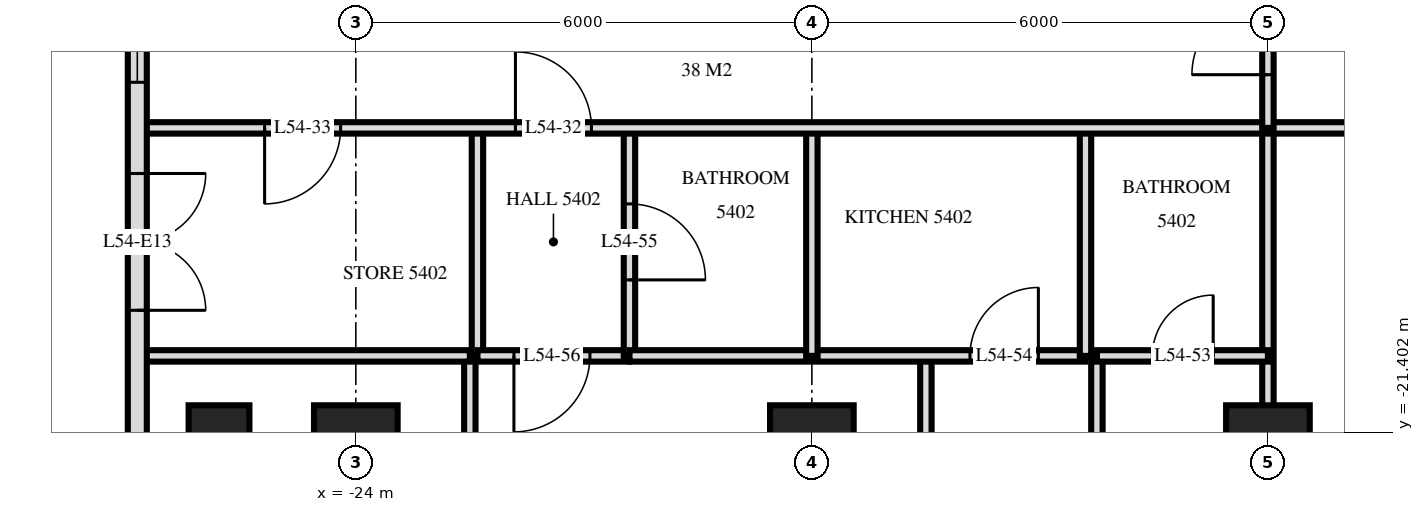
"""IFC4 building model, lengths in metres.
Left out: names, types, materials, properties, quantities, classifications, styles, units other than length and angle.
Written with IfcOpenShell. Run it as: python <this file> out.ifc"""

import sys

from ifc_helpers import new_model, si_unit, direction, frame, frame_2d, origin, origin_2d, place, context, subcontext, project, spatial, rectangle, extrude, element, fill, save


model = new_model("IFC4")
c1 = context("Model", 3, precision=1e-05, world=origin(), true_north=direction((0.0, 1.0)))
c2 = subcontext(c1, "Body", "Model", "MODEL_VIEW")
j1 = project(units=[si_unit("LENGTHUNIT", "METRE"), si_unit("PLANEANGLEUNIT", "RADIAN")], contexts=[c1])
p1 = place(None, origin())
s1 = spatial("IfcSite", under=j1, at=p1, CompositionType="ELEMENT")
p2 = place(p1, origin())
s2 = spatial("IfcBuilding", under=s1, at=p2, CompositionType="ELEMENT")
p3 = place(p2, frame((0.0, 0.0, 208.1)))
s3 = spatial("IfcBuildingStorey", under=s2, at=p3, CompositionType="ELEMENT", Elevation=208.1)
p4 = place(p3, frame((-25.8, -21.6, 0.0), z_axis=(0.0, 0.0, 1.0), x_axis=(0.0, 1.0, 0.0)))
e1 = element("IfcColumn", 1, at=p4, inside=s3, PredefinedType="COLUMN", context=c2, shape_type="SweptSolid", body=[
    extrude(rectangle(XDim=1.1, YDim=0.8, at=origin_2d()), origin(), (0.0, 0.0, 1.0), 3.5),
])
for number, where, z_axis, x_axis in (
    (2, (-24.0, -21.6, 0.0), (0.0, 0.0, 1.0), (1.0, 0.0, 0.0)),
    (3, (-18.0, -21.6, 0.0), (0.0, 0.0, 1.0), (1.0, 0.0, 0.0)),
    (4, (-12.0, -21.6, 0.0), (0.0, 0.0, 1.0), (1.0, 0.0, 0.0)),
):
    element("IfcColumn", number, at=place(p3, frame(where, z_axis=z_axis, x_axis=x_axis)), inside=s3, PredefinedType="COLUMN", context=c2, shape_type="SweptSolid", body=[
        extrude(rectangle(XDim=1.1, YDim=1.1, at=origin_2d()), origin(), (0.0, 0.0, 1.0), 3.5),
    ])
p5 = place(p3, frame((-26.875, -3.325, 0.0), z_axis=(0.0, 0.0, 1.0), x_axis=(0.0, -1.0, 0.0)))
e5 = element("IfcWall", 5, at=p5, inside=s3, PredefinedType="SOLIDWALL", context=c2, shape_type="SweptSolid", body=[
    extrude(rectangle(XDim=21.551, YDim=0.25, at=frame_2d((10.775, 0.0))), origin(), (0.0, 0.0, 1.0), 3.22),
])
p6 = place(p5, frame((6.65, 0.0, 0.0)))
e6 = element("IfcOpeningElement", 6, at=p6, cuts=e5, PredefinedType="OPENING", context=c2, shape_type="SweptSolid", body=[
    extrude(rectangle(XDim=1.8, YDim=2.4, at=frame_2d((0.9, 1.2))), frame((0.0, 0.135, 0.0), z_axis=(0.0, -1.0, 0.0), x_axis=(1.0, 0.0, 0.0)), (0.0, 0.0, 1.0), 0.27),
])
p7 = place(p5, frame((12.275, 0.0, 0.9)))
e7 = element("IfcOpeningElement", 7, at=p7, cuts=e5, PredefinedType="OPENING", context=c2, shape_type="SweptSolid", body=[
    extrude(rectangle(XDim=1.2, YDim=1.5, at=frame_2d((0.6, 0.75))), frame((0.0, 0.135, 0.0), z_axis=(0.0, -1.0, 0.0), x_axis=(1.0, 0.0, 0.0)), (0.0, 0.0, 1.0), 0.27),
])
p8 = place(p5, frame((14.675, 0.0, 0.0)))
e8 = element("IfcOpeningElement", 8, at=p8, cuts=e5, PredefinedType="OPENING", context=c2, shape_type="SweptSolid", body=[
    extrude(rectangle(XDim=1.8, YDim=2.4, at=frame_2d((0.9, 1.2))), frame((0.0, 0.135, 0.0), z_axis=(0.0, -1.0, 0.0), x_axis=(1.0, 0.0, 0.0)), (0.0, 0.0, 1.0), 0.27),
])
p9 = place(p5, frame((18.875, 0.0, 0.0)))
e9 = element("IfcOpeningElement", 9, at=p9, cuts=e5, PredefinedType="OPENING", context=c2, shape_type="SweptSolid", body=[
    extrude(rectangle(XDim=1.8, YDim=2.4, at=frame_2d((0.9, 1.2))), frame((0.0, 0.135, 0.0), z_axis=(0.0, -1.0, 0.0), x_axis=(1.0, 0.0, 0.0)), (0.0, 0.0, 1.0), 0.27),
])
p10 = place(p3, frame((-12.0, -17.4, 0.0), z_axis=(0.0, 0.0, 1.0), x_axis=(0.0, 1.0, 0.0)))
e10 = element("IfcWall", 10, at=p10, inside=s3, PredefinedType="PARTITIONING", context=c2, shape_type="SweptSolid", body=[
    extrude(rectangle(XDim=2.35, YDim=0.15, at=frame_2d((1.175, 0.0))), origin(), (0.0, 0.0, 1.0), 3.22),
])
p11 = place(p10, frame((0.7, 0.0, 0.0)))
e11 = element("IfcOpeningElement", 11, at=p11, cuts=e10, PredefinedType="OPENING", context=c2, shape_type="SweptSolid", body=[
    extrude(rectangle(XDim=1.0, YDim=2.1, at=frame_2d((0.5, 1.05))), frame((0.0, 0.085, 0.0), z_axis=(0.0, -1.0, 0.0), x_axis=(1.0, 0.0, 0.0)), (0.0, 0.0, 1.0), 0.17),
])
p12 = place(p3, frame((-12.0, -29.22, 0.0), z_axis=(0.0, 0.0, 1.0), x_axis=(0.0, 1.0, 0.0)))
e12 = element("IfcWall", 12, at=p12, inside=s3, PredefinedType="PARTITIONING", context=c2, shape_type="SweptSolid", body=[
    extrude(rectangle(XDim=11.82, YDim=0.15, at=frame_2d((5.91, 0.0))), origin(), (0.0, 0.0, 1.0), 3.22),
])
p13 = place(p3, frame((-14.25, -29.22, 0.0), z_axis=(0.0, 0.0, 1.0), x_axis=(0.0, 1.0, 0.0)))
e13 = element("IfcWall", 13, at=p13, inside=s3, PredefinedType="PARTITIONING", context=c2, shape_type="SweptSolid", body=[
    extrude(rectangle(XDim=8.82, YDim=0.15, at=frame_2d((4.41, 0.0))), origin(), (0.0, 0.0, 1.0), 3.22),
])
p14 = place(p13, frame((3.87, 0.0, 0.0)))
e14 = element("IfcOpeningElement", 14, at=p14, cuts=e13, PredefinedType="OPENING", context=c2, shape_type="SweptSolid", body=[
    extrude(rectangle(XDim=0.9, YDim=2.1, at=frame_2d((0.45, 1.05))), frame((0.0, 0.085, 0.0), z_axis=(0.0, -1.0, 0.0), x_axis=(1.0, 0.0, 0.0)), (0.0, 0.0, 1.0), 0.17),
])
p15 = place(p3, frame((-14.4, -20.4, 0.0), z_axis=(0.0, 0.0, 1.0), x_axis=(0.0, 1.0, 0.0)))
e15 = element("IfcWall", 15, at=p15, inside=s3, PredefinedType="PARTITIONING", context=c2, shape_type="SweptSolid", body=[
    extrude(rectangle(XDim=3.0, YDim=0.15, at=frame_2d((1.5, 0.0))), origin(), (0.0, 0.0, 1.0), 3.22),
])
p16 = place(p3, frame((-16.5, -29.22, 0.0), z_axis=(0.0, 0.0, 1.0), x_axis=(0.0, 1.0, 0.0)))
e16 = element("IfcWall", 16, at=p16, inside=s3, PredefinedType="PARTITIONING", context=c2, shape_type="SweptSolid", body=[
    extrude(rectangle(XDim=8.82, YDim=0.15, at=frame_2d((4.41, 0.0))), origin(), (0.0, 0.0, 1.0), 3.22),
])
p17 = place(p16, frame((3.85, 0.0, 0.0)))
e17 = element("IfcOpeningElement", 17, at=p17, cuts=e16, PredefinedType="OPENING", context=c2, shape_type="SweptSolid", body=[
    extrude(rectangle(XDim=0.9, YDim=2.1, at=frame_2d((0.45, 1.05))), frame((0.0, 0.085, 0.0), z_axis=(0.0, -1.0, 0.0), x_axis=(1.0, 0.0, 0.0)), (0.0, 0.0, 1.0), 0.17),
])
p18 = place(p3, frame((-18.0, -20.4, 0.0), z_axis=(0.0, 0.0, 1.0), x_axis=(0.0, 1.0, 0.0)))
e18 = element("IfcWall", 18, at=p18, inside=s3, PredefinedType="PARTITIONING", context=c2, shape_type="SweptSolid", body=[
    extrude(rectangle(XDim=3.0, YDim=0.15, at=frame_2d((1.5, 0.0))), origin(), (0.0, 0.0, 1.0), 3.22),
])
p19 = place(p3, frame((-20.4, -20.4, 0.0), z_axis=(0.0, 0.0, 1.0), x_axis=(0.0, 1.0, 0.0)))
e19 = element("IfcWall", 19, at=p19, inside=s3, PredefinedType="PARTITIONING", context=c2, shape_type="SweptSolid", body=[
    extrude(rectangle(XDim=3.0, YDim=0.15, at=frame_2d((1.5, 0.0))), origin(), (0.0, 0.0, 1.0), 3.22),
])
p20 = place(p19, frame((1.0, 0.0, 0.0)))
e20 = element("IfcOpeningElement", 20, at=p20, cuts=e19, PredefinedType="OPENING", context=c2, shape_type="SweptSolid", body=[
    extrude(rectangle(XDim=1.0, YDim=2.1, at=frame_2d((0.5, 1.05))), frame((0.0, 0.085, 0.0), z_axis=(0.0, -1.0, 0.0), x_axis=(1.0, 0.0, 0.0)), (0.0, 0.0, 1.0), 0.17),
])
p21 = place(p3, frame((-22.4, -20.4, 0.0), z_axis=(0.0, 0.0, 1.0), x_axis=(0.0, 1.0, 0.0)))
e21 = element("IfcWall", 21, at=p21, inside=s3, PredefinedType="PARTITIONING", context=c2, shape_type="SweptSolid", body=[
    extrude(rectangle(XDim=3.0, YDim=0.15, at=frame_2d((1.5, 0.0))), origin(), (0.0, 0.0, 1.0), 3.22),
])
p22 = place(p3, frame((-22.5, -29.217, 0.0), z_axis=(0.0, 0.0, 1.0), x_axis=(0.0, 1.0, 0.0)))
e22 = element("IfcWall", 22, at=p22, inside=s3, PredefinedType="PARTITIONING", context=c2, shape_type="SweptSolid", body=[
    extrude(rectangle(XDim=8.817, YDim=0.15, at=frame_2d((4.408, 0.0))), origin(), (0.0, 0.0, 1.0), 3.22),
])
p23 = place(p22, frame((3.886, 0.0, 0.0)))
e23 = element("IfcOpeningElement", 23, at=p23, cuts=e22, PredefinedType="OPENING", context=c2, shape_type="SweptSolid", body=[
    extrude(rectangle(XDim=0.9, YDim=2.1, at=frame_2d((0.45, 1.05))), frame((0.0, 0.085, 0.0), z_axis=(0.0, -1.0, 0.0), x_axis=(1.0, 0.0, 0.0)), (0.0, 0.0, 1.0), 0.17),
])
p24 = place(p3, frame((-22.4, -20.4, 0.0), z_axis=(0.0, 0.0, 1.0), x_axis=(1.0, 0.0, 0.0)))
e24 = element("IfcWall", 24, at=p24, inside=s3, PredefinedType="PARTITIONING", context=c2, shape_type="SweptSolid", body=[
    extrude(rectangle(XDim=2.0, YDim=0.15, at=frame_2d((1.0, 0.0))), origin(), (0.0, 0.0, 1.0), 3.22),
])
p25 = place(p24, frame((0.48, 0.0, 0.0)))
e25 = element("IfcOpeningElement", 25, at=p25, cuts=e24, PredefinedType="OPENING", context=c2, shape_type="SweptSolid", body=[
    extrude(rectangle(XDim=1.0, YDim=2.1, at=frame_2d((0.5, 1.05))), frame((0.0, 0.085, 0.0), z_axis=(0.0, -1.0, 0.0), x_axis=(1.0, 0.0, 0.0)), (0.0, 0.0, 1.0), 0.17),
])
p26 = place(p3, frame((-26.82, -20.4, 0.0), z_axis=(0.0, 0.0, 1.0), x_axis=(1.0, 0.0, 0.0)))
e26 = element("IfcWall", 26, at=p26, inside=s3, PredefinedType="PARTITIONING", context=c2, shape_type="SweptSolid", body=[
    extrude(rectangle(XDim=4.32, YDim=0.15, at=frame_2d((2.16, 0.0))), origin(), (0.0, 0.0, 1.0), 3.22),
])
p27 = place(p3, frame((-20.4, -20.4, 0.0), z_axis=(0.0, 0.0, 1.0), x_axis=(1.0, 0.0, 0.0)))
e27 = element("IfcWall", 27, at=p27, inside=s3, PredefinedType="PARTITIONING", context=c2, shape_type="SweptSolid", body=[
    extrude(rectangle(XDim=6.0, YDim=0.15, at=frame_2d((3.0, 0.0))), origin(), (0.0, 0.0, 1.0), 3.22),
])
p28 = place(p27, frame((4.48, 0.0, 0.0)))
e28 = element("IfcOpeningElement", 28, at=p28, cuts=e27, PredefinedType="OPENING", context=c2, shape_type="SweptSolid", body=[
    extrude(rectangle(XDim=0.9, YDim=2.1, at=frame_2d((0.45, 1.05))), frame((0.0, 0.085, 0.0), z_axis=(0.0, -1.0, 0.0), x_axis=(1.0, 0.0, 0.0)), (0.0, 0.0, 1.0), 0.17),
])
p29 = place(p3, frame((-14.25, -20.4, 0.0), z_axis=(0.0, 0.0, 1.0), x_axis=(1.0, 0.0, 0.0)))
e29 = element("IfcWall", 29, at=p29, inside=s3, PredefinedType="PARTITIONING", context=c2, shape_type="SweptSolid", body=[
    extrude(rectangle(XDim=2.25, YDim=0.15, at=frame_2d((1.125, 0.0))), origin(), (0.0, 0.0, 1.0), 3.22),
])
p30 = place(p29, frame((0.73, 0.0, 0.0)))
e30 = element("IfcOpeningElement", 30, at=p30, cuts=e29, PredefinedType="OPENING", context=c2, shape_type="SweptSolid", body=[
    extrude(rectangle(XDim=0.8, YDim=2.1, at=frame_2d((0.4, 1.05))), frame((0.0, 0.085, 0.0), z_axis=(0.0, -1.0, 0.0), x_axis=(1.0, 0.0, 0.0)), (0.0, 0.0, 1.0), 0.17),
])
p31 = place(p3, frame((-26.82, -17.4, 0.0), z_axis=(0.0, 0.0, 1.0), x_axis=(1.0, 0.0, 0.0)))
e31 = element("IfcWall", 31, at=p31, inside=s3, PredefinedType="PARTITIONING", context=c2, shape_type="SweptSolid", body=[
    extrude(rectangle(XDim=53.64, YDim=0.15, at=frame_2d((26.82, 0.0))), origin(), (0.0, 0.0, 1.0), 3.22),
])
p32 = place(p31, frame((4.92, 0.0, 0.0)))
e32 = element("IfcOpeningElement", 32, at=p32, cuts=e31, PredefinedType="OPENING", context=c2, shape_type="SweptSolid", body=[
    extrude(rectangle(XDim=1.0, YDim=2.1, at=frame_2d((0.5, 1.05))), frame((0.0, 0.085, 0.0), z_axis=(0.0, -1.0, 0.0), x_axis=(1.0, 0.0, 0.0)), (0.0, 0.0, 1.0), 0.17),
])
p33 = place(p31, frame((1.62, 0.0, 0.0)))
e33 = element("IfcOpeningElement", 33, at=p33, cuts=e31, PredefinedType="OPENING", context=c2, shape_type="SweptSolid", body=[
    extrude(rectangle(XDim=1.0, YDim=2.1, at=frame_2d((0.5, 1.05))), frame((0.0, 0.085, 0.0), z_axis=(0.0, -1.0, 0.0), x_axis=(1.0, 0.0, 0.0)), (0.0, 0.0, 1.0), 0.17),
])
p34 = place(p31, frame((41.17, 0.0, 0.0)))
e34 = element("IfcOpeningElement", 34, at=p34, cuts=e31, PredefinedType="OPENING", context=c2, shape_type="SweptSolid", body=[
    extrude(rectangle(XDim=1.0, YDim=2.1, at=frame_2d((0.5, 1.05))), frame((0.0, 0.085, 0.0), z_axis=(0.0, -1.0, 0.0), x_axis=(1.0, 0.0, 0.0)), (0.0, 0.0, 1.0), 0.17),
])
p35 = place(p31, frame((49.42, 0.0, 0.0)))
e35 = element("IfcOpeningElement", 35, at=p35, cuts=e31, PredefinedType="OPENING", context=c2, shape_type="SweptSolid", body=[
    extrude(rectangle(XDim=1.0, YDim=2.1, at=frame_2d((0.5, 1.05))), frame((0.0, 0.085, 0.0), z_axis=(0.0, -1.0, 0.0), x_axis=(1.0, 0.0, 0.0)), (0.0, 0.0, 1.0), 0.17),
])
p36 = place(p31, frame((47.62, 0.0, 0.0)))
e36 = element("IfcOpeningElement", 36, at=p36, cuts=e31, PredefinedType="OPENING", context=c2, shape_type="SweptSolid", body=[
    extrude(rectangle(XDim=1.0, YDim=2.1, at=frame_2d((0.5, 1.05))), frame((0.0, 0.085, 0.0), z_axis=(0.0, -1.0, 0.0), x_axis=(1.0, 0.0, 0.0)), (0.0, 0.0, 1.0), 0.17),
])
p37 = place(p31, frame((21.82, 0.0, 0.0)))
e37 = element("IfcOpeningElement", 37, at=p37, cuts=e31, PredefinedType="OPENING", context=c2, shape_type="SweptSolid", body=[
    extrude(rectangle(XDim=1.0, YDim=2.1, at=frame_2d((0.5, 1.05))), frame((0.0, 0.085, 0.0), z_axis=(0.0, -1.0, 0.0), x_axis=(1.0, 0.0, 0.0)), (0.0, 0.0, 1.0), 0.17),
])
p38 = place(p31, frame((33.82, 0.0, 0.0)))
e38 = element("IfcOpeningElement", 38, at=p38, cuts=e31, PredefinedType="OPENING", context=c2, shape_type="SweptSolid", body=[
    extrude(rectangle(XDim=1.0, YDim=2.1, at=frame_2d((0.5, 1.05))), frame((0.0, 0.085, 0.0), z_axis=(0.0, -1.0, 0.0), x_axis=(1.0, 0.0, 0.0)), (0.0, 0.0, 1.0), 0.17),
])
p39 = place(p7, origin())
e39 = element("IfcWindow", 39, at=p39, inside=s3, PartitioningType="SINGLE_PANEL", PredefinedType="WINDOW", context=c2, shape_type="SweptSolid", body=[
    extrude(rectangle(XDim=1.2, YDim=1.5, at=frame_2d((0.6, 0.75))), frame((0.0, 0.03, 0.0), z_axis=(0.0, -1.0, 0.0), x_axis=(1.0, 0.0, 0.0)), (0.0, 0.0, 1.0), 0.06),
])
fill(e7, e39)
p40 = place(p8, origin())
e40 = element("IfcDoor", 40, at=p40, inside=s3, OperationType="DOUBLE_DOOR_SINGLE_SWING", PredefinedType="DOOR", context=c2, shape_type="SweptSolid", body=[
    extrude(rectangle(XDim=1.8, YDim=2.4, at=frame_2d((0.9, 1.2))), frame((0.0, 0.025, 0.0), z_axis=(0.0, -1.0, 0.0), x_axis=(1.0, 0.0, 0.0)), (0.0, 0.0, 1.0), 0.05),
])
fill(e8, e40)
p41 = place(p11, origin())
e41 = element("IfcDoor", 41, at=p41, inside=s3, OperationType="SINGLE_SWING_RIGHT", PredefinedType="DOOR", context=c2, shape_type="SweptSolid", body=[
    extrude(rectangle(XDim=1.0, YDim=2.1, at=frame_2d((0.5, 1.05))), frame((0.0, 0.025, 0.0), z_axis=(0.0, -1.0, 0.0), x_axis=(1.0, 0.0, 0.0)), (0.0, 0.0, 1.0), 0.05),
])
fill(e11, e41)
p42 = place(p32, origin())
e42 = element("IfcDoor", 42, at=p42, inside=s3, OperationType="SINGLE_SWING_RIGHT", PredefinedType="DOOR", context=c2, shape_type="SweptSolid", body=[
    extrude(rectangle(XDim=1.0, YDim=2.1, at=frame_2d((0.5, 1.05))), frame((0.0, 0.025, 0.0), z_axis=(0.0, -1.0, 0.0), x_axis=(1.0, 0.0, 0.0)), (0.0, 0.0, 1.0), 0.05),
])
fill(e32, e42)
p43 = place(p33, frame((0.5, 0.0, 0.0), z_axis=(0.0, 0.0, 1.0), x_axis=(-1.0, 0.0, 0.0)))
e43 = element("IfcDoor", 43, at=p43, inside=s3, OperationType="SINGLE_SWING_LEFT", PredefinedType="DOOR", context=c2, shape_type="SweptSolid", body=[
    extrude(rectangle(XDim=1.0, YDim=2.1, at=frame_2d((0.0, 1.05))), frame((0.0, -0.025, 0.0), z_axis=(0.0, 1.0, 0.0), x_axis=(-1.0, 0.0, 0.0)), (0.0, 0.0, 1.0), 0.05),
])
fill(e33, e43)
p44 = place(p30, origin())
e44 = element("IfcDoor", 44, at=p44, inside=s3, OperationType="SINGLE_SWING_LEFT", PredefinedType="DOOR", context=c2, shape_type="SweptSolid", body=[
    extrude(rectangle(XDim=0.8, YDim=2.1, at=frame_2d((0.4, 1.05))), frame((0.0, 0.025, 0.0), z_axis=(0.0, -1.0, 0.0), x_axis=(1.0, 0.0, 0.0)), (0.0, 0.0, 1.0), 0.05),
])
fill(e30, e44)
p45 = place(p28, origin())
e45 = element("IfcDoor", 45, at=p45, inside=s3, OperationType="SINGLE_SWING_LEFT", PredefinedType="DOOR", context=c2, shape_type="SweptSolid", body=[
    extrude(rectangle(XDim=0.9, YDim=2.1, at=frame_2d((0.45, 1.05))), frame((0.0, 0.025, 0.0), z_axis=(0.0, -1.0, 0.0), x_axis=(1.0, 0.0, 0.0)), (0.0, 0.0, 1.0), 0.05),
])
fill(e28, e45)
p46 = place(p20, frame((0.5, 0.0, 0.0), z_axis=(0.0, 0.0, 1.0), x_axis=(-1.0, 0.0, 0.0)))
e46 = element("IfcDoor", 46, at=p46, inside=s3, OperationType="SINGLE_SWING_LEFT", PredefinedType="DOOR", context=c2, shape_type="SweptSolid", body=[
    extrude(rectangle(XDim=1.0, YDim=2.1, at=frame_2d((0.0, 1.05))), frame((0.0, -0.025, 0.0), z_axis=(0.0, 1.0, 0.0), x_axis=(-1.0, 0.0, 0.0)), (0.0, 0.0, 1.0), 0.05),
])
fill(e20, e46)
p47 = place(p25, frame((0.5, 0.0, 0.0), z_axis=(0.0, 0.0, 1.0), x_axis=(-1.0, 0.0, 0.0)))
e47 = element("IfcDoor", 47, at=p47, inside=s3, OperationType="SINGLE_SWING_LEFT", PredefinedType="DOOR", context=c2, shape_type="SweptSolid", body=[
    extrude(rectangle(XDim=1.0, YDim=2.1, at=frame_2d((0.0, 1.05))), frame((0.0, -0.025, 0.0), z_axis=(0.0, 1.0, 0.0), x_axis=(-1.0, 0.0, 0.0)), (0.0, 0.0, 1.0), 0.05),
])
fill(e25, e47)
save(model, sys.argv[1])
